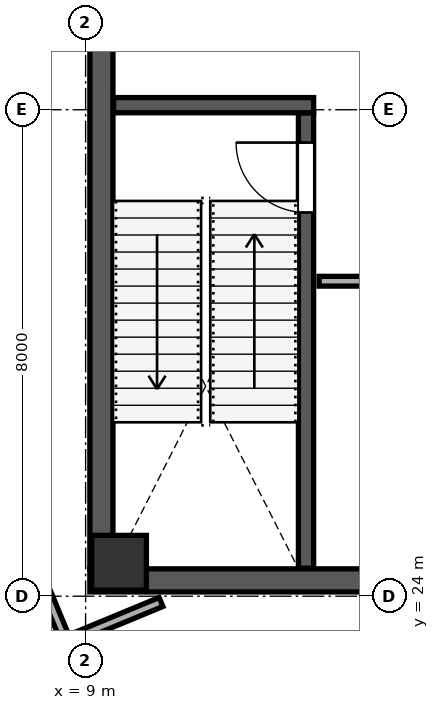
"""IFC4 building model, lengths in metres.
Left out: names, types, materials, properties, quantities, classifications, styles, units other than length and angle.
Written with IfcOpenShell. Run it as: python <this file> out.ifc"""

import sys

from ifc_helpers import new_model, si_unit, direction, frame, frame_2d, origin, origin_2d, place, context, subcontext, project, spatial, rectangle, extrude, source, transform, mapped, element, fill, save


model = new_model("IFC4")
c1 = context("Model", 3, precision=1e-05, world=origin(), true_north=direction((0.0, 1.0)))
c2 = subcontext(c1, "Body", "Model", "MODEL_VIEW")
j1 = project(units=[si_unit("LENGTHUNIT", "METRE"), si_unit("PLANEANGLEUNIT", "RADIAN")], contexts=[c1])
p1 = place(None, origin())
s1 = spatial("IfcSite", under=j1, at=p1, CompositionType="ELEMENT")
p2 = place(p1, origin())
s2 = spatial("IfcBuilding", under=s1, at=p2, CompositionType="ELEMENT")
p3 = place(p2, frame((0.0, 0.0, 355.2)))
s3 = spatial("IfcBuildingStorey", under=s2, at=p3, CompositionType="ELEMENT", Elevation=355.2)
m1 = source(origin(), c2, "Body", "SweptSolid", [
    extrude(rectangle(XDim=0.9, YDim=0.9, at=origin_2d()), origin(), (0.0, 0.0, 1.0), 4.799),
])
p4 = place(p3, frame((9.55, 24.55, 0.001), z_axis=(0.0, 0.0, 1.0), x_axis=(1.0, 0.0, 0.0)))
e1 = element("IfcColumn", 1, at=p4, inside=s3, PredefinedType="COLUMN", context=c2, shape_type="MappedRepresentation", body=[
    mapped(m1, transform((0.0, 0.0, 0.0), scale=1.0)),
])
p5 = place(p3, frame((9.26, 24.45, 0.0), z_axis=(0.0, 0.0, 1.0), x_axis=(0.0, 1.0, 0.0)))
e2 = element("IfcWall", 2, at=p5, inside=s3, PredefinedType="SHEAR", context=c2, shape_type="SweptSolid", body=[
    extrude(rectangle(XDim=15.1, YDim=0.38, at=frame_2d((7.55, 0.0))), origin(), (0.0, 0.0, 1.0), 4.52),
])
p6 = place(p5, frame((8.7, 0.0, 0.0)))
e3 = element("IfcOpeningElement", 3, at=p6, cuts=e2, PredefinedType="OPENING", context=c2, shape_type="SweptSolid", body=[
    extrude(rectangle(XDim=1.15, YDim=2.2, at=frame_2d((0.575, 1.1))), frame((0.0, 0.2, 0.0), z_axis=(0.0, -1.0, 0.0), x_axis=(1.0, 0.0, 0.0)), (0.0, 0.0, 1.0), 0.4),
])
p7 = place(p3, frame((9.07, 24.26, 0.0), z_axis=(0.0, 0.0, 1.0), x_axis=(1.0, 0.0, 0.0)))
e4 = element("IfcWall", 4, at=p7, inside=s3, PredefinedType="SHEAR", context=c2, shape_type="SweptSolid", body=[
    extrude(rectangle(XDim=17.86, YDim=0.38, at=frame_2d((8.93, 0.0))), origin(), (0.0, 0.0, 1.0), 4.52),
])
p8 = place(p3, frame((12.625, 24.46, 0.0), z_axis=(0.0, 0.0, 1.0), x_axis=(0.0, 1.0, 0.0)))
e5 = element("IfcWall", 5, at=p8, inside=s3, PredefinedType="SHEAR", context=c2, shape_type="SweptSolid", body=[
    extrude(rectangle(XDim=7.49, YDim=0.25, at=frame_2d((3.745, 0.0))), origin(), (0.0, 0.0, 1.0), 4.52),
])
p9 = place(p8, frame((5.85, 0.0, 0.0)))
e6 = element("IfcOpeningElement", 6, at=p9, cuts=e5, PredefinedType="OPENING", context=c2, shape_type="SweptSolid", body=[
    extrude(rectangle(XDim=1.15, YDim=2.2, at=frame_2d((0.575, 1.1))), frame((0.0, 0.135, 0.0), z_axis=(0.0, -1.0, 0.0), x_axis=(1.0, 0.0, 0.0)), (0.0, 0.0, 1.0), 0.27),
])
p10 = place(p3, frame((9.46, 32.075, 0.0), z_axis=(0.0, 0.0, 1.0), x_axis=(1.0, 0.0, 0.0)))
e7 = element("IfcWall", 7, at=p10, inside=s3, PredefinedType="SHEAR", context=c2, shape_type="SweptSolid", body=[
    extrude(rectangle(XDim=3.29, YDim=0.25, at=frame_2d((1.645, 0.0))), origin(), (0.0, 0.0, 1.0), 4.52),
])
p11 = place(p3, frame((12.84, 29.18, 0.0), z_axis=(0.0, 0.0, 1.0), x_axis=(1.0, 0.0, 0.0)))
e8 = element("IfcWall", 8, at=p11, inside=s3, PredefinedType="PARTITIONING", context=c2, shape_type="SweptSolid", body=[
    extrude(rectangle(XDim=8.37, YDim=0.16, at=frame_2d((4.185, 0.0))), origin(), (0.0, 0.0, 1.0), 4.52),
])
p12 = place(p11, frame((0.95, 0.0, 0.0)))
e9 = element("IfcOpeningElement", 9, at=p12, cuts=e8, PredefinedType="OPENING", context=c2, shape_type="SweptSolid", body=[
    extrude(rectangle(XDim=0.85, YDim=2.1, at=frame_2d((0.425, 1.05))), frame((0.0, 0.09, 0.0), z_axis=(0.0, -1.0, 0.0), x_axis=(1.0, 0.0, 0.0)), (0.0, 0.0, 1.0), 0.18),
])
p13 = place(p11, frame((4.2, 0.0, 0.0)))
e10 = element("IfcOpeningElement", 10, at=p13, cuts=e8, PredefinedType="OPENING", context=c2, shape_type="SweptSolid", body=[
    extrude(rectangle(XDim=0.85, YDim=2.1, at=frame_2d((0.425, 1.05))), frame((0.0, 0.09, 0.0), z_axis=(0.0, -1.0, 0.0), x_axis=(1.0, 0.0, 0.0)), (0.0, 0.0, 1.0), 0.18),
])
p14 = place(p3, frame((3.923, 34.742, 0.0), z_axis=(0.0, 0.0, 1.0), x_axis=(0.382686508818, -0.923878258197, 0.0)))
e11 = element("IfcWall", 11, at=p14, inside=s3, PredefinedType="PARTITIONING", context=c2, shape_type="SweptSolid", body=[
    extrude(rectangle(XDim=12.39, YDim=0.16, at=frame_2d((6.195, 0.0))), origin(), (0.0, 0.0, 1.0), 4.52),
])
p15 = place(p3, frame((8.716, 23.274, 0.0), z_axis=(0.0, 0.0, 1.0), x_axis=(0.92386344226, 0.382722275359, 0.0)))
e12 = element("IfcWall", 12, at=p15, inside=s3, PredefinedType="PARTITIONING", context=c2, shape_type="SweptSolid", body=[
    extrude(rectangle(XDim=1.649, YDim=0.16, at=frame_2d((0.824, 0.0))), origin(), (0.0, 0.0, 1.0), 4.52),
])
m2 = source(origin(), c2, "Body", "SweptSolid", [
    extrude(rectangle(XDim=1.15, YDim=2.2, at=frame_2d((0.575, 1.1))), frame((0.0, 0.025, 0.0), z_axis=(0.0, -1.0, 0.0), x_axis=(1.0, 0.0, 0.0)), (0.0, 0.0, 1.0), 0.05),
])
p16 = place(p9, origin())
e13 = element("IfcDoor", 13, at=p16, inside=s3, OperationType="SINGLE_SWING_RIGHT", PredefinedType="DOOR", context=c2, shape_type="MappedRepresentation", body=[
    mapped(m2, transform((0.0, 0.0, 0.0), scale=1.0)),
])
fill(e6, e13)
save(model, sys.argv[1])
